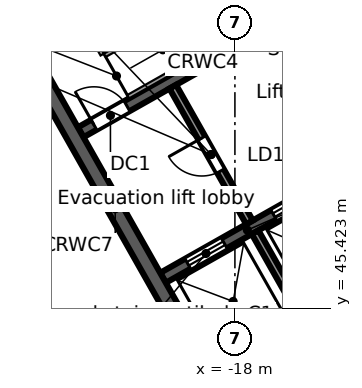
"""IFC4 building model, lengths in metres.
Left out: names, types, materials, properties, quantities, classifications, styles, units other than length and angle.
Written with IfcOpenShell. Run it as: python <this file> out.ifc"""

import sys

from ifc_helpers import new_model, si_unit, direction, frame, frame_2d, origin, place, context, subcontext, project, spatial, rectangle, extrude, element, fill, save


model = new_model("IFC4")
c1 = context("Model", 3, precision=1e-05, world=origin(), true_north=direction((0.0, 1.0)))
c2 = subcontext(c1, "Body", "Model", "MODEL_VIEW")
j1 = project(units=[si_unit("LENGTHUNIT", "METRE"), si_unit("PLANEANGLEUNIT", "RADIAN")], contexts=[c1])
p1 = place(None, origin())
s1 = spatial("IfcSite", under=j1, at=p1, CompositionType="ELEMENT")
p2 = place(p1, origin())
s2 = spatial("IfcBuilding", under=s1, at=p2, CompositionType="ELEMENT")
p3 = place(p2, frame((0.0, 0.0, 300.7)))
s3 = spatial("IfcBuildingStorey", under=s2, at=p3, CompositionType="ELEMENT", Elevation=300.7)
p4 = place(p3, frame((-58.732, 38.771, 0.0), z_axis=(0.0, 0.0, 1.0), x_axis=(0.870355615581, 0.492423702137, 0.0)))
e1 = element("IfcWall", 1, at=p4, inside=s3, PredefinedType="STANDARD", context=c2, shape_type="SweptSolid", body=[
    extrude(rectangle(XDim=64.052, YDim=0.25, at=frame_2d((32.026, 0.0))), origin(), (0.0, 0.0, 1.0), 3.52),
])
p5 = place(p4, frame((61.259, 0.0, 0.8)))
e2 = element("IfcOpeningElement", 2, at=p5, cuts=e1, PredefinedType="OPENING", context=c2, shape_type="SweptSolid", body=[
    extrude(rectangle(XDim=2.4, YDim=2.2, at=frame_2d((1.2, 1.1))), frame((0.0, 0.135, 0.0), z_axis=(0.0, -1.0, 0.0), x_axis=(1.0, 0.0, 0.0)), (0.0, 0.0, 1.0), 0.27),
])
p6 = place(p4, frame((58.216, 0.0, 0.8)))
e3 = element("IfcOpeningElement", 3, at=p6, cuts=e1, PredefinedType="OPENING", context=c2, shape_type="SweptSolid", body=[
    extrude(rectangle(XDim=2.4, YDim=2.2, at=frame_2d((1.2, 1.1))), frame((0.0, 0.135, 0.0), z_axis=(0.0, -1.0, 0.0), x_axis=(1.0, 0.0, 0.0)), (0.0, 0.0, 1.0), 0.27),
])
p7 = place(p4, frame((55.173, 0.0, 0.8)))
e4 = element("IfcOpeningElement", 4, at=p7, cuts=e1, PredefinedType="OPENING", context=c2, shape_type="SweptSolid", body=[
    extrude(rectangle(XDim=2.4, YDim=2.2, at=frame_2d((1.2, 1.1))), frame((0.0, 0.135, 0.0), z_axis=(0.0, -1.0, 0.0), x_axis=(1.0, 0.0, 0.0)), (0.0, 0.0, 1.0), 0.27),
])
p8 = place(p4, frame((52.129, 0.0, 0.8)))
e5 = element("IfcOpeningElement", 5, at=p8, cuts=e1, PredefinedType="OPENING", context=c2, shape_type="SweptSolid", body=[
    extrude(rectangle(XDim=2.4, YDim=2.2, at=frame_2d((1.2, 1.1))), frame((0.0, 0.135, 0.0), z_axis=(0.0, -1.0, 0.0), x_axis=(1.0, 0.0, 0.0)), (0.0, 0.0, 1.0), 0.27),
])
p9 = place(p4, frame((49.086, 0.0, 0.8)))
e6 = element("IfcOpeningElement", 6, at=p9, cuts=e1, PredefinedType="OPENING", context=c2, shape_type="SweptSolid", body=[
    extrude(rectangle(XDim=2.4, YDim=2.2, at=frame_2d((1.2, 1.1))), frame((0.0, 0.135, 0.0), z_axis=(0.0, -1.0, 0.0), x_axis=(1.0, 0.0, 0.0)), (0.0, 0.0, 1.0), 0.27),
])
p10 = place(p4, frame((46.043, 0.0, 0.8)))
e7 = element("IfcOpeningElement", 7, at=p10, cuts=e1, PredefinedType="OPENING", context=c2, shape_type="SweptSolid", body=[
    extrude(rectangle(XDim=2.4, YDim=2.2, at=frame_2d((1.2, 1.1))), frame((0.0, 0.135, 0.0), z_axis=(0.0, -1.0, 0.0), x_axis=(1.0, 0.0, 0.0)), (0.0, 0.0, 1.0), 0.27),
])
p11 = place(p4, frame((43.0, 0.0, 0.8)))
e8 = element("IfcOpeningElement", 8, at=p11, cuts=e1, PredefinedType="OPENING", context=c2, shape_type="SweptSolid", body=[
    extrude(rectangle(XDim=2.4, YDim=2.2, at=frame_2d((1.2, 1.1))), frame((0.0, 0.135, 0.0), z_axis=(0.0, -1.0, 0.0), x_axis=(1.0, 0.0, 0.0)), (0.0, 0.0, 1.0), 0.27),
])
p12 = place(p4, frame((39.956, 0.0, 0.8)))
e9 = element("IfcOpeningElement", 9, at=p12, cuts=e1, PredefinedType="OPENING", context=c2, shape_type="SweptSolid", body=[
    extrude(rectangle(XDim=2.4, YDim=2.2, at=frame_2d((1.2, 1.1))), frame((0.0, 0.135, 0.0), z_axis=(0.0, -1.0, 0.0), x_axis=(1.0, 0.0, 0.0)), (0.0, 0.0, 1.0), 0.27),
])
p13 = place(p4, frame((36.913, 0.0, 0.8)))
e10 = element("IfcOpeningElement", 10, at=p13, cuts=e1, PredefinedType="OPENING", context=c2, shape_type="SweptSolid", body=[
    extrude(rectangle(XDim=2.4, YDim=2.2, at=frame_2d((1.2, 1.1))), frame((0.0, 0.135, 0.0), z_axis=(0.0, -1.0, 0.0), x_axis=(1.0, 0.0, 0.0)), (0.0, 0.0, 1.0), 0.27),
])
p14 = place(p4, frame((33.87, 0.0, 0.8)))
e11 = element("IfcOpeningElement", 11, at=p14, cuts=e1, PredefinedType="OPENING", context=c2, shape_type="SweptSolid", body=[
    extrude(rectangle(XDim=2.4, YDim=2.2, at=frame_2d((1.2, 1.1))), frame((0.0, 0.135, 0.0), z_axis=(0.0, -1.0, 0.0), x_axis=(1.0, 0.0, 0.0)), (0.0, 0.0, 1.0), 0.27),
])
p15 = place(p4, frame((30.826, 0.0, 0.8)))
e12 = element("IfcOpeningElement", 12, at=p15, cuts=e1, PredefinedType="OPENING", context=c2, shape_type="SweptSolid", body=[
    extrude(rectangle(XDim=2.4, YDim=2.2, at=frame_2d((1.2, 1.1))), frame((0.0, 0.135, 0.0), z_axis=(0.0, -1.0, 0.0), x_axis=(1.0, 0.0, 0.0)), (0.0, 0.0, 1.0), 0.27),
])
p16 = place(p4, frame((27.783, 0.0, 0.8)))
e13 = element("IfcOpeningElement", 13, at=p16, cuts=e1, PredefinedType="OPENING", context=c2, shape_type="SweptSolid", body=[
    extrude(rectangle(XDim=2.4, YDim=2.2, at=frame_2d((1.2, 1.1))), frame((0.0, 0.135, 0.0), z_axis=(0.0, -1.0, 0.0), x_axis=(1.0, 0.0, 0.0)), (0.0, 0.0, 1.0), 0.27),
])
p17 = place(p4, frame((24.74, 0.0, 0.8)))
e14 = element("IfcOpeningElement", 14, at=p17, cuts=e1, PredefinedType="OPENING", context=c2, shape_type="SweptSolid", body=[
    extrude(rectangle(XDim=2.4, YDim=2.2, at=frame_2d((1.2, 1.1))), frame((0.0, 0.135, 0.0), z_axis=(0.0, -1.0, 0.0), x_axis=(1.0, 0.0, 0.0)), (0.0, 0.0, 1.0), 0.27),
])
p18 = place(p4, frame((21.696, 0.0, 0.8)))
e15 = element("IfcOpeningElement", 15, at=p18, cuts=e1, PredefinedType="OPENING", context=c2, shape_type="SweptSolid", body=[
    extrude(rectangle(XDim=2.4, YDim=2.2, at=frame_2d((1.2, 1.1))), frame((0.0, 0.135, 0.0), z_axis=(0.0, -1.0, 0.0), x_axis=(1.0, 0.0, 0.0)), (0.0, 0.0, 1.0), 0.27),
])
p19 = place(p4, frame((18.653, 0.0, 0.8)))
e16 = element("IfcOpeningElement", 16, at=p19, cuts=e1, PredefinedType="OPENING", context=c2, shape_type="SweptSolid", body=[
    extrude(rectangle(XDim=2.4, YDim=2.2, at=frame_2d((1.2, 1.1))), frame((0.0, 0.135, 0.0), z_axis=(0.0, -1.0, 0.0), x_axis=(1.0, 0.0, 0.0)), (0.0, 0.0, 1.0), 0.27),
])
p20 = place(p4, frame((15.61, 0.0, 0.8)))
e17 = element("IfcOpeningElement", 17, at=p20, cuts=e1, PredefinedType="OPENING", context=c2, shape_type="SweptSolid", body=[
    extrude(rectangle(XDim=2.4, YDim=2.2, at=frame_2d((1.2, 1.1))), frame((0.0, 0.135, 0.0), z_axis=(0.0, -1.0, 0.0), x_axis=(1.0, 0.0, 0.0)), (0.0, 0.0, 1.0), 0.27),
])
p21 = place(p4, frame((12.567, 0.0, 0.8)))
e18 = element("IfcOpeningElement", 18, at=p21, cuts=e1, PredefinedType="OPENING", context=c2, shape_type="SweptSolid", body=[
    extrude(rectangle(XDim=2.4, YDim=2.2, at=frame_2d((1.2, 1.1))), frame((0.0, 0.135, 0.0), z_axis=(0.0, -1.0, 0.0), x_axis=(1.0, 0.0, 0.0)), (0.0, 0.0, 1.0), 0.27),
])
p22 = place(p4, frame((9.523, 0.0, 0.8)))
e19 = element("IfcOpeningElement", 19, at=p22, cuts=e1, PredefinedType="OPENING", context=c2, shape_type="SweptSolid", body=[
    extrude(rectangle(XDim=2.4, YDim=2.2, at=frame_2d((1.2, 1.1))), frame((0.0, 0.135, 0.0), z_axis=(0.0, -1.0, 0.0), x_axis=(1.0, 0.0, 0.0)), (0.0, 0.0, 1.0), 0.27),
])
p23 = place(p4, frame((6.48, 0.0, 0.8)))
e20 = element("IfcOpeningElement", 20, at=p23, cuts=e1, PredefinedType="OPENING", context=c2, shape_type="SweptSolid", body=[
    extrude(rectangle(XDim=2.4, YDim=2.2, at=frame_2d((1.2, 1.1))), frame((0.0, 0.135, 0.0), z_axis=(0.0, -1.0, 0.0), x_axis=(1.0, 0.0, 0.0)), (0.0, 0.0, 1.0), 0.27),
])
p24 = place(p4, frame((3.437, 0.0, 0.8)))
e21 = element("IfcOpeningElement", 21, at=p24, cuts=e1, PredefinedType="OPENING", context=c2, shape_type="SweptSolid", body=[
    extrude(rectangle(XDim=2.4, YDim=2.2, at=frame_2d((1.2, 1.1))), frame((0.0, 0.135, 0.0), z_axis=(0.0, -1.0, 0.0), x_axis=(1.0, 0.0, 0.0)), (0.0, 0.0, 1.0), 0.27),
])
p25 = place(p4, frame((0.393, 0.0, 0.8)))
e22 = element("IfcOpeningElement", 22, at=p25, cuts=e1, PredefinedType="OPENING", context=c2, shape_type="SweptSolid", body=[
    extrude(rectangle(XDim=2.4, YDim=2.2, at=frame_2d((1.2, 1.1))), frame((0.0, 0.135, 0.0), z_axis=(0.0, -1.0, 0.0), x_axis=(1.0, 0.0, 0.0)), (0.0, 0.0, 1.0), 0.27),
])
p26 = place(p3, frame((-3.017, 46.293, 0.0), z_axis=(0.0, 0.0, 1.0), x_axis=(-0.870355474887, -0.492423950812, 0.0)))
e23 = element("IfcWall", 23, at=p26, inside=s3, PredefinedType="STANDARD", context=c2, shape_type="SweptSolid", body=[
    extrude(rectangle(XDim=40.34, YDim=0.25, at=frame_2d((20.17, 0.0))), origin(), (0.0, 0.0, 1.0), 3.52),
])
p27 = place(p26, frame((37.428, 0.0, 0.8)))
e24 = element("IfcOpeningElement", 24, at=p27, cuts=e23, PredefinedType="OPENING", context=c2, shape_type="SweptSolid", body=[
    extrude(rectangle(XDim=2.4, YDim=2.2, at=frame_2d((1.2, 1.1))), frame((0.0, 0.135, 0.0), z_axis=(0.0, -1.0, 0.0), x_axis=(1.0, 0.0, 0.0)), (0.0, 0.0, 1.0), 0.27),
])
p28 = place(p26, frame((34.372, 0.0, 0.0)))
e25 = element("IfcOpeningElement", 25, at=p28, cuts=e23, PredefinedType="OPENING", context=c2, shape_type="SweptSolid", body=[
    extrude(rectangle(XDim=1.8, YDim=2.4, at=frame_2d((0.9, 1.2))), frame((0.0, 0.135, 0.0), z_axis=(0.0, -1.0, 0.0), x_axis=(1.0, 0.0, 0.0)), (0.0, 0.0, 1.0), 0.27),
])
p29 = place(p26, frame((30.716, 0.0, 0.8)))
e26 = element("IfcOpeningElement", 26, at=p29, cuts=e23, PredefinedType="OPENING", context=c2, shape_type="SweptSolid", body=[
    extrude(rectangle(XDim=2.4, YDim=2.2, at=frame_2d((1.2, 1.1))), frame((0.0, 0.135, 0.0), z_axis=(0.0, -1.0, 0.0), x_axis=(1.0, 0.0, 0.0)), (0.0, 0.0, 1.0), 0.27),
])
p30 = place(p26, frame((27.36, 0.0, 0.8)))
e27 = element("IfcOpeningElement", 27, at=p30, cuts=e23, PredefinedType="OPENING", context=c2, shape_type="SweptSolid", body=[
    extrude(rectangle(XDim=2.4, YDim=2.2, at=frame_2d((1.2, 1.1))), frame((0.0, 0.135, 0.0), z_axis=(0.0, -1.0, 0.0), x_axis=(1.0, 0.0, 0.0)), (0.0, 0.0, 1.0), 0.27),
])
p31 = place(p26, frame((24.304, 0.0, 0.0)))
e28 = element("IfcOpeningElement", 28, at=p31, cuts=e23, PredefinedType="OPENING", context=c2, shape_type="SweptSolid", body=[
    extrude(rectangle(XDim=1.8, YDim=2.4, at=frame_2d((0.9, 1.2))), frame((0.0, 0.135, 0.0), z_axis=(0.0, -1.0, 0.0), x_axis=(1.0, 0.0, 0.0)), (0.0, 0.0, 1.0), 0.27),
])
p32 = place(p26, frame((20.648, 0.0, 0.8)))
e29 = element("IfcOpeningElement", 29, at=p32, cuts=e23, PredefinedType="OPENING", context=c2, shape_type="SweptSolid", body=[
    extrude(rectangle(XDim=2.4, YDim=2.2, at=frame_2d((1.2, 1.1))), frame((0.0, 0.135, 0.0), z_axis=(0.0, -1.0, 0.0), x_axis=(1.0, 0.0, 0.0)), (0.0, 0.0, 1.0), 0.27),
])
p33 = place(p26, frame((17.292, 0.0, 0.8)))
e30 = element("IfcOpeningElement", 30, at=p33, cuts=e23, PredefinedType="OPENING", context=c2, shape_type="SweptSolid", body=[
    extrude(rectangle(XDim=2.4, YDim=2.2, at=frame_2d((1.2, 1.1))), frame((0.0, 0.135, 0.0), z_axis=(0.0, -1.0, 0.0), x_axis=(1.0, 0.0, 0.0)), (0.0, 0.0, 1.0), 0.27),
])
p34 = place(p26, frame((14.236, 0.0, 0.0)))
e31 = element("IfcOpeningElement", 31, at=p34, cuts=e23, PredefinedType="OPENING", context=c2, shape_type="SweptSolid", body=[
    extrude(rectangle(XDim=1.8, YDim=2.4, at=frame_2d((0.9, 1.2))), frame((0.0, 0.135, 0.0), z_axis=(0.0, -1.0, 0.0), x_axis=(1.0, 0.0, 0.0)), (0.0, 0.0, 1.0), 0.27),
])
p35 = place(p26, frame((10.58, 0.0, 0.8)))
e32 = element("IfcOpeningElement", 32, at=p35, cuts=e23, PredefinedType="OPENING", context=c2, shape_type="SweptSolid", body=[
    extrude(rectangle(XDim=2.4, YDim=2.2, at=frame_2d((1.2, 1.1))), frame((0.0, 0.135, 0.0), z_axis=(0.0, -1.0, 0.0), x_axis=(1.0, 0.0, 0.0)), (0.0, 0.0, 1.0), 0.27),
])
p36 = place(p26, frame((7.224, 0.0, 0.8)))
e33 = element("IfcOpeningElement", 33, at=p36, cuts=e23, PredefinedType="OPENING", context=c2, shape_type="SweptSolid", body=[
    extrude(rectangle(XDim=2.4, YDim=2.2, at=frame_2d((1.2, 1.1))), frame((0.0, 0.135, 0.0), z_axis=(0.0, -1.0, 0.0), x_axis=(1.0, 0.0, 0.0)), (0.0, 0.0, 1.0), 0.27),
])
p37 = place(p26, frame((4.168, 0.0, 0.0)))
e34 = element("IfcOpeningElement", 34, at=p37, cuts=e23, PredefinedType="OPENING", context=c2, shape_type="SweptSolid", body=[
    extrude(rectangle(XDim=1.8, YDim=2.4, at=frame_2d((0.9, 1.2))), frame((0.0, 0.135, 0.0), z_axis=(0.0, -1.0, 0.0), x_axis=(1.0, 0.0, 0.0)), (0.0, 0.0, 1.0), 0.27),
])
p38 = place(p26, frame((0.512, 0.0, 0.8)))
e35 = element("IfcOpeningElement", 35, at=p38, cuts=e23, PredefinedType="OPENING", context=c2, shape_type="SweptSolid", body=[
    extrude(rectangle(XDim=2.4, YDim=2.2, at=frame_2d((1.2, 1.1))), frame((0.0, 0.135, 0.0), z_axis=(0.0, -1.0, 0.0), x_axis=(1.0, 0.0, 0.0)), (0.0, 0.0, 1.0), 0.27),
])
p39 = place(p3, frame((-17.975, 42.017, 0.0), z_axis=(0.0, 0.0, 1.0), x_axis=(0.87034965173, 0.492434243055, 0.0)))
e36 = element("IfcWall", 36, at=p39, inside=s3, PredefinedType="SOLIDWALL", context=c2, shape_type="SweptSolid", body=[
    extrude(rectangle(XDim=15.0, YDim=0.4, at=frame_2d((7.5, 0.0))), origin(), (0.0, 0.0, 1.0), 3.52),
])
p40 = place(p39, frame((6.1, 0.0, 0.0)))
e37 = element("IfcOpeningElement", 37, at=p40, cuts=e36, PredefinedType="OPENING", context=c2, shape_type="SweptSolid", body=[
    extrude(rectangle(XDim=1.2, YDim=2.1, at=frame_2d((0.6, 1.05))), frame((0.0, 0.21, 0.0), z_axis=(0.0, -1.0, 0.0), x_axis=(1.0, 0.0, 0.0)), (0.0, 0.0, 1.0), 0.42),
])
p41 = place(p3, frame((-19.892, 46.218, 0.0), z_axis=(0.0, 0.0, 1.0), x_axis=(0.870341639186, 0.492448404505, 0.0)))
e38 = element("IfcWall", 38, at=p41, inside=s3, PredefinedType="SOLIDWALL", context=c2, shape_type="SweptSolid", body=[
    extrude(rectangle(XDim=5.1, YDim=0.3, at=frame_2d((2.55, 0.0))), origin(), (0.0, 0.0, 1.0), 3.52),
])
p42 = place(p41, frame((0.75, 0.0, 0.0)))
e39 = element("IfcOpeningElement", 39, at=p42, cuts=e38, PredefinedType="OPENING", context=c2, shape_type="SweptSolid", body=[
    extrude(rectangle(XDim=1.1, YDim=2.1, at=frame_2d((0.55, 1.05))), frame((0.0, 0.16, 0.0), z_axis=(0.0, -1.0, 0.0), x_axis=(1.0, 0.0, 0.0)), (0.0, 0.0, 1.0), 0.32),
])
p43 = place(p41, frame((3.35, 0.0, 0.0)))
e40 = element("IfcOpeningElement", 40, at=p43, cuts=e38, PredefinedType="OPENING", context=c2, shape_type="SweptSolid", body=[
    extrude(rectangle(XDim=1.1, YDim=2.1, at=frame_2d((0.55, 1.05))), frame((0.0, 0.16, 0.0), z_axis=(0.0, -1.0, 0.0), x_axis=(1.0, 0.0, 0.0)), (0.0, 0.0, 1.0), 0.32),
])
p44 = place(p3, frame((-22.059, 50.047, 0.0), z_axis=(0.0, 0.0, 1.0), x_axis=(0.87035077051, 0.49243226567, 0.0)))
e41 = element("IfcWall", 41, at=p44, inside=s3, PredefinedType="SOLIDWALL", context=c2, shape_type="SweptSolid", body=[
    extrude(rectangle(XDim=7.4, YDim=0.3, at=frame_2d((3.7, 0.0))), origin(), (0.0, 0.0, 1.0), 3.52),
])
p45 = place(p44, frame((0.4, 0.0, 0.0)))
e42 = element("IfcOpeningElement", 42, at=p45, cuts=e41, PredefinedType="OPENING", context=c2, shape_type="SweptSolid", body=[
    extrude(rectangle(XDim=1.0, YDim=2.1, at=frame_2d((0.5, 1.05))), frame((0.0, 0.16, 0.0), z_axis=(0.0, -1.0, 0.0), x_axis=(1.0, 0.0, 0.0)), (0.0, 0.0, 1.0), 0.32),
])
p46 = place(p3, frame((-24.4, 53.779, 0.0), z_axis=(0.0, 0.0, 1.0), x_axis=(0.492421663121, -0.870356769198, 0.0)))
e43 = element("IfcWall", 43, at=p46, inside=s3, PredefinedType="SOLIDWALL", context=c2, shape_type="SweptSolid", body=[
    extrude(rectangle(XDim=13.2, YDim=0.4, at=frame_2d((6.6, 0.0))), origin(), (0.0, 0.0, 1.0), 3.52),
])
p47 = place(p3, frame((-17.469, 47.417, 0.0), z_axis=(0.0, 0.0, 1.0), x_axis=(0.492466057713, -0.870331650579, 0.0)))
e44 = element("IfcWall", 44, at=p47, inside=s3, PredefinedType="SOLIDWALL", context=c2, shape_type="SweptSolid", body=[
    extrude(rectangle(XDim=4.25, YDim=0.2, at=frame_2d((2.125, 0.0))), origin(), (0.0, 0.0, 1.0), 3.52),
])
p48 = place(p3, frame((-19.635, 51.246, 0.0), z_axis=(0.0, 0.0, 1.0), x_axis=(0.492408451753, -0.87036424366, 0.0)))
e45 = element("IfcWall", 45, at=p48, inside=s3, PredefinedType="PARTITIONING", context=c2, shape_type="SweptSolid", body=[
    extrude(rectangle(XDim=4.1, YDim=0.2, at=frame_2d((2.05, 0.0))), origin(), (0.0, 0.0, 1.0), 3.52),
])
p49 = place(p48, frame((1.55, 0.0, 0.0)))
e46 = element("IfcOpeningElement", 46, at=p49, cuts=e45, PredefinedType="OPENING", context=c2, shape_type="SweptSolid", body=[
    extrude(rectangle(XDim=1.0, YDim=2.1, at=frame_2d((0.5, 1.05))), frame((0.0, 0.11, 0.0), z_axis=(0.0, -1.0, 0.0), x_axis=(1.0, 0.0, 0.0)), (0.0, 0.0, 1.0), 0.22),
])
p50 = place(p42, origin())
e47 = element("IfcDoor", 47, at=p50, inside=s3, OperationType="DOUBLE_DOOR_SLIDING", PredefinedType="DOOR", context=c2, shape_type="SweptSolid", body=[
    extrude(rectangle(XDim=1.1, YDim=2.1, at=frame_2d((0.55, 1.05))), frame((0.0, 0.025, 0.0), z_axis=(0.0, -1.0, 0.0), x_axis=(1.0, 0.0, 0.0)), (0.0, 0.0, 1.0), 0.05),
])
fill(e39, e47)
p51 = place(p43, origin())
e48 = element("IfcDoor", 48, at=p51, inside=s3, OperationType="DOUBLE_DOOR_SLIDING", PredefinedType="DOOR", context=c2, shape_type="SweptSolid", body=[
    extrude(rectangle(XDim=1.1, YDim=2.1, at=frame_2d((0.55, 1.05))), frame((0.0, 0.025, 0.0), z_axis=(0.0, -1.0, 0.0), x_axis=(1.0, 0.0, 0.0)), (0.0, 0.0, 1.0), 0.05),
])
fill(e40, e48)
p52 = place(p45, origin())
e49 = element("IfcDoor", 49, at=p52, inside=s3, OperationType="SINGLE_SWING_LEFT", PredefinedType="DOOR", context=c2, shape_type="SweptSolid", body=[
    extrude(rectangle(XDim=1.0, YDim=2.1, at=frame_2d((0.5, 1.05))), frame((0.0, 0.025, 0.0), z_axis=(0.0, -1.0, 0.0), x_axis=(1.0, 0.0, 0.0)), (0.0, 0.0, 1.0), 0.05),
])
fill(e42, e49)
p53 = place(p49, frame((1.0, 0.0, 0.0), z_axis=(0.0, 0.0, 1.0), x_axis=(-1.0, 0.0, 0.0)))
e50 = element("IfcDoor", 50, at=p53, inside=s3, OperationType="SINGLE_SWING_RIGHT", PredefinedType="DOOR", context=c2, shape_type="SweptSolid", body=[
    extrude(rectangle(XDim=1.0, YDim=2.1, at=frame_2d((0.5, 1.05))), frame((0.0, 0.025, 0.0), z_axis=(0.0, -1.0, 0.0), x_axis=(1.0, 0.0, 0.0)), (0.0, 0.0, 1.0), 0.05),
])
fill(e46, e50)
save(model, sys.argv[1])
